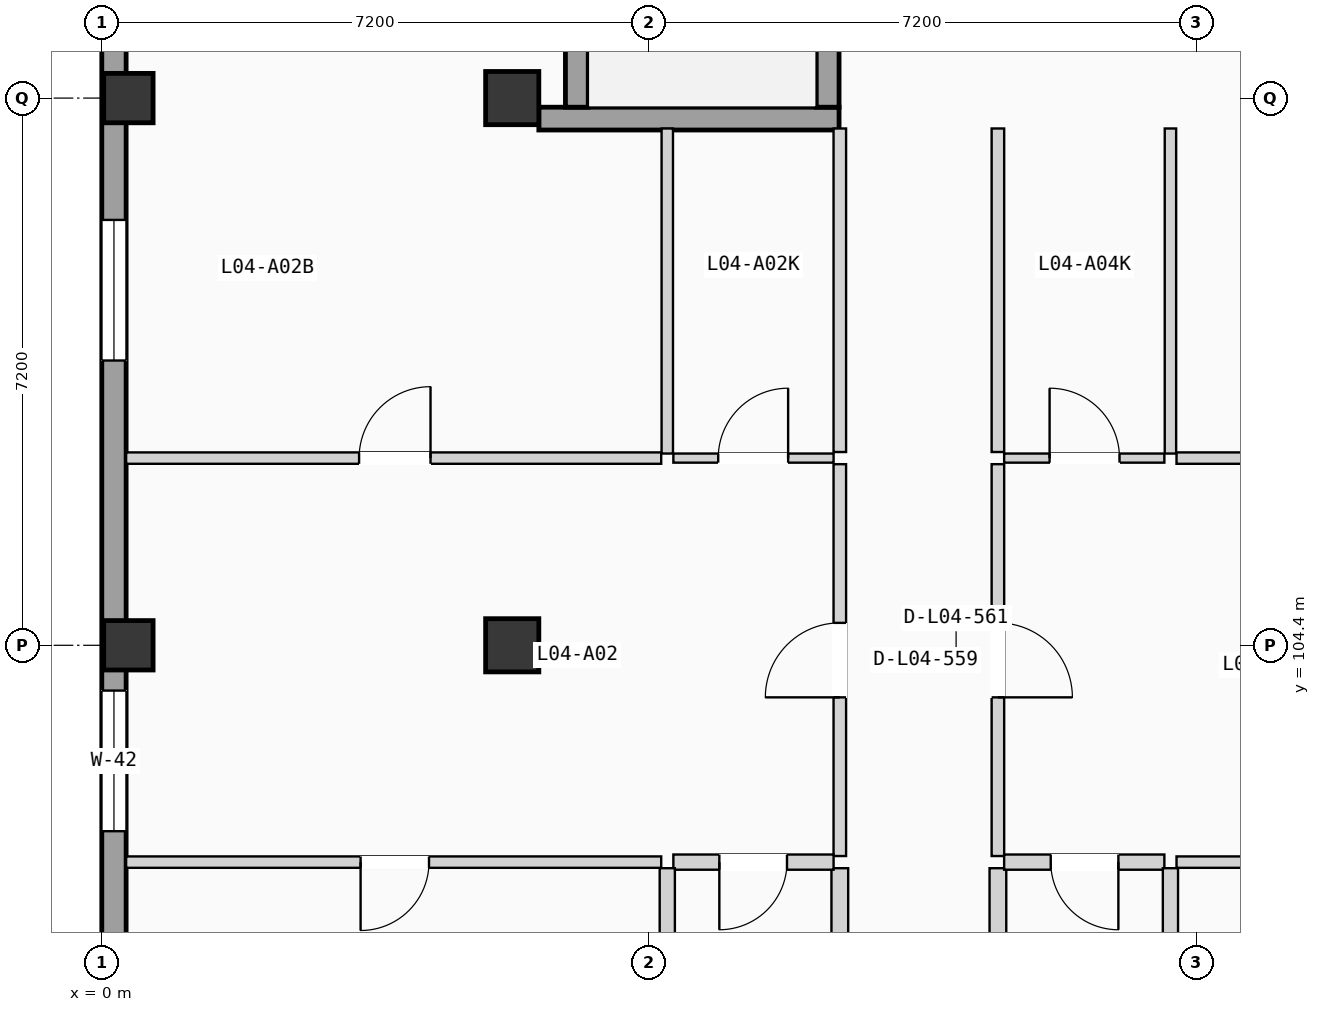
"""IFC4 building model, lengths in metres.
Left out: names, types, materials, properties, quantities, classifications, styles, units other than length and angle.
Written with IfcOpenShell. Run it as: python <this file> out.ifc"""

import sys

from ifc_helpers import new_model, si_unit, direction, frame, frame_2d, origin, origin_2d, place, context, subcontext, project, spatial, rectangle, extrude, element, fill, save


model = new_model("IFC4")
c1 = context("Model", 3, precision=1e-05, world=origin(), true_north=direction((0.0, 1.0)))
c2 = subcontext(c1, "Body", "Model", "MODEL_VIEW")
j1 = project(units=[si_unit("LENGTHUNIT", "METRE"), si_unit("PLANEANGLEUNIT", "RADIAN")], contexts=[c1])
p1 = place(None, origin())
s1 = spatial("IfcSite", under=j1, at=p1, CompositionType="ELEMENT")
p2 = place(p1, origin())
s2 = spatial("IfcBuilding", under=s1, at=p2, CompositionType="ELEMENT")
p3 = place(p2, frame((0.0, 0.0, 15.225)))
s3 = spatial("IfcBuildingStorey", under=s2, at=p3, CompositionType="ELEMENT", Elevation=15.225)
for number, where, z_axis, x_axis in (
    (1, (0.35, 104.4, 0.0), (0.0, 0.0, 1.0), (1.0, 0.0, 0.0)),
    (2, (0.35, 111.6, 0.0), (0.0, 0.0, 1.0), (1.0, 0.0, 0.0)),
):
    element("IfcColumn", number, at=place(p3, frame(where, z_axis=z_axis, x_axis=x_axis)), inside=s3, PredefinedType="COLUMN", context=c2, shape_type="SweptSolid", body=[
        extrude(rectangle(XDim=0.65, YDim=0.65, at=origin_2d()), origin(), (0.0, 0.0, 1.0), 3.15),
    ])
for number, where, z_axis, x_axis in (
    (3, (5.4, 104.4, 0.0), (0.0, 0.0, 1.0), (1.0, 0.0, 0.0)),
    (4, (5.4, 111.6, 0.0), (0.0, 0.0, 1.0), (1.0, 0.0, 0.0)),
):
    element("IfcColumn", number, at=place(p3, frame(where, z_axis=z_axis, x_axis=x_axis)), inside=s3, PredefinedType="COLUMN", context=c2, shape_type="SweptSolid", body=[
        extrude(rectangle(XDim=0.7, YDim=0.7, at=origin_2d()), origin(), (0.0, 0.0, 1.0), 3.15),
    ])
p4 = place(p3, frame((0.16, 68.72, 0.0), z_axis=(0.0, 0.0, 1.0), x_axis=(0.0, 1.0, 0.0)))
e5 = element("IfcWall", 5, at=p4, inside=s3, PredefinedType="SOLIDWALL", context=c2, shape_type="SweptSolid", body=[
    extrude(rectangle(XDim=49.76, YDim=0.32, at=frame_2d((24.88, 0.0))), origin(), (0.0, 0.0, 1.0), 2.89),
])
p5 = place(p4, frame((16.82, 0.0, 0.555)))
e6 = element("IfcOpeningElement", 6, at=p5, cuts=e5, PredefinedType="OPENING", context=c2, shape_type="SweptSolid", body=[
    extrude(rectangle(XDim=1.72, YDim=1.65, at=frame_2d((0.86, 0.825))), frame((0.0, 0.17, 0.0), z_axis=(0.0, -1.0, 0.0), x_axis=(1.0, 0.0, 0.0)), (0.0, 0.0, 1.0), 0.34),
])
p6 = place(p4, frame((10.07, 0.0, 0.85)))
e7 = element("IfcOpeningElement", 7, at=p6, cuts=e5, PredefinedType="OPENING", context=c2, shape_type="SweptSolid", body=[
    extrude(rectangle(XDim=0.95, YDim=1.2, at=frame_2d((0.475, 0.6))), frame((0.0, 0.17, 0.0), z_axis=(0.0, -1.0, 0.0), x_axis=(1.0, 0.0, 0.0)), (0.0, 0.0, 1.0), 0.34),
])
p7 = place(p4, frame((23.955, 0.0, 0.9)))
e8 = element("IfcOpeningElement", 8, at=p7, cuts=e5, PredefinedType="OPENING", context=c2, shape_type="SweptSolid", body=[
    extrude(rectangle(XDim=1.85, YDim=1.2, at=frame_2d((0.925, 0.6))), frame((0.0, 0.17, 0.0), z_axis=(0.0, -1.0, 0.0), x_axis=(1.0, 0.0, 0.0)), (0.0, 0.0, 1.0), 0.34),
])
p8 = place(p4, frame((33.234, 0.0, 0.855)))
e9 = element("IfcOpeningElement", 9, at=p8, cuts=e5, PredefinedType="OPENING", context=c2, shape_type="SweptSolid", body=[
    extrude(rectangle(XDim=1.85, YDim=1.35, at=frame_2d((0.925, 0.675))), frame((0.0, 0.17, 0.0), z_axis=(0.0, -1.0, 0.0), x_axis=(1.0, 0.0, 0.0)), (0.0, 0.0, 1.0), 0.34),
])
p9 = place(p4, frame((29.824, 0.0, 0.705)))
e10 = element("IfcOpeningElement", 10, at=p9, cuts=e5, PredefinedType="OPENING", context=c2, shape_type="SweptSolid", body=[
    extrude(rectangle(XDim=1.85, YDim=1.5, at=frame_2d((0.925, 0.75))), frame((0.0, 0.17, 0.0), z_axis=(0.0, -1.0, 0.0), x_axis=(1.0, 0.0, 0.0)), (0.0, 0.0, 1.0), 0.34),
])
p10 = place(p4, frame((39.427, 0.0, 0.555)))
e11 = element("IfcOpeningElement", 11, at=p10, cuts=e5, PredefinedType="OPENING", context=c2, shape_type="SweptSolid", body=[
    extrude(rectangle(XDim=1.85, YDim=1.65, at=frame_2d((0.925, 0.825))), frame((0.0, 0.17, 0.0), z_axis=(0.0, -1.0, 0.0), x_axis=(1.0, 0.0, 0.0)), (0.0, 0.0, 1.0), 0.34),
])
p11 = place(p3, frame((5.75, 111.33, 0.0), z_axis=(0.0, 0.0, 1.0), x_axis=(1.0, 0.0, 0.0)))
e12 = element("IfcWall", 12, at=p11, inside=s3, PredefinedType="SHEAR", context=c2, shape_type="SweptSolid", body=[
    extrude(rectangle(XDim=3.95, YDim=0.3, at=frame_2d((1.975, 0.0))), origin(), (0.0, 0.0, 1.0), 2.89),
])
p12 = place(p3, frame((6.25, 111.48, 0.0), z_axis=(0.0, 0.0, 1.0), x_axis=(0.0, 1.0, 0.0)))
e13 = element("IfcWall", 13, at=p12, inside=s3, PredefinedType="SHEAR", context=c2, shape_type="SweptSolid", body=[
    extrude(rectangle(XDim=7.0, YDim=0.3, at=frame_2d((3.5, 0.0))), origin(), (0.0, 0.0, 1.0), 2.89),
])
p13 = place(p3, frame((9.55, 111.48, 0.0), z_axis=(0.0, 0.0, 1.0), x_axis=(0.0, 1.0, 0.0)))
e14 = element("IfcWall", 14, at=p13, inside=s3, PredefinedType="SHEAR", context=c2, shape_type="SweptSolid", body=[
    extrude(rectangle(XDim=7.0, YDim=0.3, at=frame_2d((3.5, 0.0))), origin(), (0.0, 0.0, 1.0), 2.89),
])
p14 = place(p13, frame((5.625, 0.0, 0.0)))
e15 = element("IfcOpeningElement", 15, at=p14, cuts=e14, PredefinedType="OPENING", context=c2, shape_type="SweptSolid", body=[
    extrude(rectangle(XDim=1.15, YDim=2.12, at=frame_2d((0.575, 1.06))), frame((0.0, 0.16, 0.0), z_axis=(0.0, -1.0, 0.0), x_axis=(1.0, 0.0, 0.0)), (0.0, 0.0, 1.0), 0.32),
])
p15 = place(p3, frame((9.71, 101.627, 0.0), z_axis=(0.0, 0.0, 1.0), x_axis=(0.0, 1.0, 0.0)))
e16 = element("IfcWall", 16, at=p15, inside=s3, PredefinedType="PARTITIONING", context=c2, shape_type="SweptSolid", body=[
    extrude(rectangle(XDim=5.156, YDim=0.165, at=frame_2d((2.578, 0.0))), origin(), (0.0, 0.0, 1.0), 2.87),
])
p16 = place(p15, frame((2.088, 0.0, 0.0)))
e17 = element("IfcOpeningElement", 17, at=p16, cuts=e16, PredefinedType="OPENING", context=c2, shape_type="SweptSolid", body=[
    extrude(rectangle(XDim=0.98, YDim=2.08, at=frame_2d((0.49, 1.04))), frame((0.0, 0.093, 0.0), z_axis=(0.0, -1.0, 0.0), x_axis=(1.0, 0.0, 0.0)), (0.0, 0.0, 1.0), 0.185),
])
p17 = place(p3, frame((9.71, 97.21, 0.0), z_axis=(0.0, 0.0, 1.0), x_axis=(0.0, 1.0, 0.0)))
e18 = element("IfcWall", 18, at=p17, inside=s3, PredefinedType="PLUMBINGWALL", context=c2, shape_type="SweptSolid", body=[
    extrude(rectangle(XDim=4.257, YDim=0.22, at=frame_2d((2.128, 0.0))), origin(), (0.0, 0.0, 1.0), 2.87),
])
p18 = place(p3, frame((9.71, 106.943, 0.0), z_axis=(0.0, 0.0, 1.0), x_axis=(0.0, 1.0, 0.0)))
e19 = element("IfcWall", 19, at=p18, inside=s3, PredefinedType="PARTITIONING", context=c2, shape_type="SweptSolid", body=[
    extrude(rectangle(XDim=4.257, YDim=0.165, at=frame_2d((2.128, 0.0))), origin(), (0.0, 0.0, 1.0), 2.87),
])
p19 = place(p3, frame((11.79, 101.627, 0.0), z_axis=(0.0, 0.0, 1.0), x_axis=(0.0, 1.0, 0.0)))
e20 = element("IfcWall", 20, at=p19, inside=s3, PredefinedType="PARTITIONING", context=c2, shape_type="SweptSolid", body=[
    extrude(rectangle(XDim=5.156, YDim=0.165, at=frame_2d((2.578, 0.0))), origin(), (0.0, 0.0, 1.0), 2.87),
])
p20 = place(p19, frame((2.088, 0.0, 0.0)))
e21 = element("IfcOpeningElement", 21, at=p20, cuts=e20, PredefinedType="OPENING", context=c2, shape_type="SweptSolid", body=[
    extrude(rectangle(XDim=0.98, YDim=2.08, at=frame_2d((0.49, 1.04))), frame((0.0, 0.093, 0.0), z_axis=(0.0, -1.0, 0.0), x_axis=(1.0, 0.0, 0.0)), (0.0, 0.0, 1.0), 0.185),
])
p21 = place(p3, frame((11.79, 97.21, 0.0), z_axis=(0.0, 0.0, 1.0), x_axis=(0.0, 1.0, 0.0)))
e22 = element("IfcWall", 22, at=p21, inside=s3, PredefinedType="PLUMBINGWALL", context=c2, shape_type="SweptSolid", body=[
    extrude(rectangle(XDim=4.257, YDim=0.22, at=frame_2d((2.128, 0.0))), origin(), (0.0, 0.0, 1.0), 2.87),
])
p22 = place(p3, frame((11.79, 106.943, 0.0), z_axis=(0.0, 0.0, 1.0), x_axis=(0.0, 1.0, 0.0)))
e23 = element("IfcWall", 23, at=p22, inside=s3, PredefinedType="PARTITIONING", context=c2, shape_type="SweptSolid", body=[
    extrude(rectangle(XDim=4.257, YDim=0.165, at=frame_2d((2.128, 0.0))), origin(), (0.0, 0.0, 1.0), 2.87),
])
p23 = place(p3, frame((7.52, 101.547, 0.0), z_axis=(0.0, 0.0, 1.0), x_axis=(1.0, 0.0, 0.0)))
e24 = element("IfcWall", 24, at=p23, inside=s3, PredefinedType="PLUMBINGWALL", context=c2, shape_type="SweptSolid", body=[
    extrude(rectangle(XDim=2.108, YDim=0.2, at=frame_2d((1.054, 0.0))), origin(), (0.0, 0.0, 1.0), 2.87),
])
p24 = place(p23, frame((0.605, 0.0, 0.0)))
e25 = element("IfcOpeningElement", 25, at=p24, cuts=e24, PredefinedType="OPENING", context=c2, shape_type="SweptSolid", body=[
    extrude(rectangle(XDim=0.89, YDim=2.03, at=frame_2d((0.445, 1.015))), frame((0.0, 0.11, 0.0), z_axis=(0.0, -1.0, 0.0), x_axis=(1.0, 0.0, 0.0)), (0.0, 0.0, 1.0), 0.22),
])
p25 = place(p3, frame((7.52, 106.863, 0.0), z_axis=(0.0, 0.0, 1.0), x_axis=(1.0, 0.0, 0.0)))
e26 = element("IfcWall", 26, at=p25, inside=s3, PredefinedType="PARTITIONING", context=c2, shape_type="SweptSolid", body=[
    extrude(rectangle(XDim=2.108, YDim=0.12, at=frame_2d((1.054, 0.0))), origin(), (0.0, 0.0, 1.0), 2.87),
])
p26 = place(p25, frame((0.59, 0.0, 0.0)))
e27 = element("IfcOpeningElement", 27, at=p26, cuts=e26, PredefinedType="OPENING", context=c2, shape_type="SweptSolid", body=[
    extrude(rectangle(XDim=0.92, YDim=2.02, at=frame_2d((0.46, 1.01))), frame((0.0, 0.07, 0.0), z_axis=(0.0, -1.0, 0.0), x_axis=(1.0, 0.0, 0.0)), (0.0, 0.0, 1.0), 0.14),
])
p27 = place(p3, frame((0.32, 101.547, 0.0), z_axis=(0.0, 0.0, 1.0), x_axis=(1.0, 0.0, 0.0)))
e28 = element("IfcWall", 28, at=p27, inside=s3, PredefinedType="PARTITIONING", context=c2, shape_type="SweptSolid", body=[
    extrude(rectangle(XDim=7.04, YDim=0.15, at=frame_2d((3.52, 0.0))), origin(), (0.0, 0.0, 1.0), 2.87),
])
p28 = place(p27, frame((3.085, 0.0, 0.0)))
e29 = element("IfcOpeningElement", 29, at=p28, cuts=e28, PredefinedType="OPENING", context=c2, shape_type="SweptSolid", body=[
    extrude(rectangle(XDim=0.9, YDim=2.04, at=frame_2d((0.45, 1.02))), frame((0.0, 0.085, 0.0), z_axis=(0.0, -1.0, 0.0), x_axis=(1.0, 0.0, 0.0)), (0.0, 0.0, 1.0), 0.17),
])
p29 = place(p3, frame((0.32, 106.863, 0.0), z_axis=(0.0, 0.0, 1.0), x_axis=(1.0, 0.0, 0.0)))
e30 = element("IfcWall", 30, at=p29, inside=s3, PredefinedType="PARTITIONING", context=c2, shape_type="SweptSolid", body=[
    extrude(rectangle(XDim=7.04, YDim=0.15, at=frame_2d((3.52, 0.0))), origin(), (0.0, 0.0, 1.0), 2.87),
])
p30 = place(p29, frame((3.065, 0.0, 0.0)))
e31 = element("IfcOpeningElement", 31, at=p30, cuts=e30, PredefinedType="OPENING", context=c2, shape_type="SweptSolid", body=[
    extrude(rectangle(XDim=0.94, YDim=2.06, at=frame_2d((0.47, 1.03))), frame((0.0, 0.085, 0.0), z_axis=(0.0, -1.0, 0.0), x_axis=(1.0, 0.0, 0.0)), (0.0, 0.0, 1.0), 0.17),
])
p31 = place(p3, frame((7.44, 97.21, 0.0), z_axis=(0.0, 0.0, 1.0), x_axis=(0.0, 1.0, 0.0)))
e32 = element("IfcWall", 32, at=p31, inside=s3, PredefinedType="PLUMBINGWALL", context=c2, shape_type="SweptSolid", body=[
    extrude(rectangle(XDim=4.257, YDim=0.2, at=frame_2d((2.128, 0.0))), origin(), (0.0, 0.0, 1.0), 2.87),
])
p32 = place(p3, frame((7.44, 106.923, 0.0), z_axis=(0.0, 0.0, 1.0), x_axis=(0.0, 1.0, 0.0)))
e33 = element("IfcWall", 33, at=p32, inside=s3, PredefinedType="PARTITIONING", context=c2, shape_type="SweptSolid", body=[
    extrude(rectangle(XDim=4.277, YDim=0.15, at=frame_2d((2.138, 0.0))), origin(), (0.0, 0.0, 1.0), 2.87),
])
p33 = place(p3, frame((11.872, 101.547, 0.0), z_axis=(0.0, 0.0, 1.0), x_axis=(1.0, 0.0, 0.0)))
e34 = element("IfcWall", 34, at=p33, inside=s3, PredefinedType="PLUMBINGWALL", context=c2, shape_type="SweptSolid", body=[
    extrude(rectangle(XDim=2.108, YDim=0.2, at=frame_2d((1.054, 0.0))), origin(), (0.0, 0.0, 1.0), 2.87),
])
p34 = place(p33, frame((0.613, 0.0, 0.0)))
e35 = element("IfcOpeningElement", 35, at=p34, cuts=e34, PredefinedType="OPENING", context=c2, shape_type="SweptSolid", body=[
    extrude(rectangle(XDim=0.89, YDim=2.03, at=frame_2d((0.445, 1.015))), frame((0.0, 0.11, 0.0), z_axis=(0.0, -1.0, 0.0), x_axis=(1.0, 0.0, 0.0)), (0.0, 0.0, 1.0), 0.22),
])
p35 = place(p3, frame((11.872, 106.863, 0.0), z_axis=(0.0, 0.0, 1.0), x_axis=(1.0, 0.0, 0.0)))
e36 = element("IfcWall", 36, at=p35, inside=s3, PredefinedType="PARTITIONING", context=c2, shape_type="SweptSolid", body=[
    extrude(rectangle(XDim=2.108, YDim=0.12, at=frame_2d((1.054, 0.0))), origin(), (0.0, 0.0, 1.0), 2.87),
])
p36 = place(p35, frame((0.598, 0.0, 0.0)))
e37 = element("IfcOpeningElement", 37, at=p36, cuts=e36, PredefinedType="OPENING", context=c2, shape_type="SweptSolid", body=[
    extrude(rectangle(XDim=0.92, YDim=2.02, at=frame_2d((0.46, 1.01))), frame((0.0, 0.07, 0.0), z_axis=(0.0, -1.0, 0.0), x_axis=(1.0, 0.0, 0.0)), (0.0, 0.0, 1.0), 0.14),
])
p37 = place(p3, frame((14.14, 101.547, 0.0), z_axis=(0.0, 0.0, 1.0), x_axis=(1.0, 0.0, 0.0)))
e38 = element("IfcWall", 38, at=p37, inside=s3, PredefinedType="PARTITIONING", context=c2, shape_type="SweptSolid", body=[
    extrude(rectangle(XDim=7.14, YDim=0.15, at=frame_2d((3.57, 0.0))), origin(), (0.0, 0.0, 1.0), 2.87),
])
p38 = place(p37, frame((3.015, 0.0, 0.0)))
e39 = element("IfcOpeningElement", 39, at=p38, cuts=e38, PredefinedType="OPENING", context=c2, shape_type="SweptSolid", body=[
    extrude(rectangle(XDim=1.08, YDim=2.1, at=frame_2d((0.54, 1.05))), frame((0.0, 0.085, 0.0), z_axis=(0.0, -1.0, 0.0), x_axis=(1.0, 0.0, 0.0)), (0.0, 0.0, 1.0), 0.17),
])
p39 = place(p3, frame((14.14, 106.863, 0.0), z_axis=(0.0, 0.0, 1.0), x_axis=(1.0, 0.0, 0.0)))
e40 = element("IfcWall", 40, at=p39, inside=s3, PredefinedType="PARTITIONING", context=c2, shape_type="SweptSolid", body=[
    extrude(rectangle(XDim=7.14, YDim=0.15, at=frame_2d((3.57, 0.0))), origin(), (0.0, 0.0, 1.0), 2.87),
])
p40 = place(p39, frame((3.105, 0.0, 0.0)))
e41 = element("IfcOpeningElement", 41, at=p40, cuts=e40, PredefinedType="OPENING", context=c2, shape_type="SweptSolid", body=[
    extrude(rectangle(XDim=0.9, YDim=2.04, at=frame_2d((0.45, 1.02))), frame((0.0, 0.085, 0.0), z_axis=(0.0, -1.0, 0.0), x_axis=(1.0, 0.0, 0.0)), (0.0, 0.0, 1.0), 0.17),
])
p41 = place(p3, frame((14.06, 97.21, 0.0), z_axis=(0.0, 0.0, 1.0), x_axis=(0.0, 1.0, 0.0)))
e42 = element("IfcWall", 42, at=p41, inside=s3, PredefinedType="PLUMBINGWALL", context=c2, shape_type="SweptSolid", body=[
    extrude(rectangle(XDim=4.257, YDim=0.2, at=frame_2d((2.128, 0.0))), origin(), (0.0, 0.0, 1.0), 2.87),
])
p42 = place(p3, frame((14.06, 106.923, 0.0), z_axis=(0.0, 0.0, 1.0), x_axis=(0.0, 1.0, 0.0)))
e43 = element("IfcWall", 43, at=p42, inside=s3, PredefinedType="PARTITIONING", context=c2, shape_type="SweptSolid", body=[
    extrude(rectangle(XDim=4.277, YDim=0.15, at=frame_2d((2.138, 0.0))), origin(), (0.0, 0.0, 1.0), 2.87),
])
p43 = place(p8, origin())
e44 = element("IfcWindow", 44, at=p43, inside=s3, PartitioningType="DOUBLE_PANEL_VERTICAL", PredefinedType="WINDOW", context=c2, shape_type="SweptSolid", body=[
    extrude(rectangle(XDim=1.85, YDim=1.35, at=frame_2d((0.925, 0.675))), frame((0.0, 0.03, 0.0), z_axis=(0.0, -1.0, 0.0), x_axis=(1.0, 0.0, 0.0)), (0.0, 0.0, 1.0), 0.06),
])
fill(e9, e44)
p44 = place(p10, origin())
e45 = element("IfcWindow", 45, at=p44, inside=s3, PartitioningType="DOUBLE_PANEL_VERTICAL", PredefinedType="WINDOW", context=c2, shape_type="SweptSolid", body=[
    extrude(rectangle(XDim=1.85, YDim=1.65, at=frame_2d((0.925, 0.825))), frame((0.0, 0.03, 0.0), z_axis=(0.0, -1.0, 0.0), x_axis=(1.0, 0.0, 0.0)), (0.0, 0.0, 1.0), 0.06),
])
fill(e11, e45)
p45 = place(p16, origin())
e46 = element("IfcDoor", 46, at=p45, inside=s3, OperationType="SINGLE_SWING_LEFT", PredefinedType="DOOR", context=c2, shape_type="SweptSolid", body=[
    extrude(rectangle(XDim=0.98, YDim=2.08, at=frame_2d((0.49, 1.04))), frame((0.0, 0.025, 0.0), z_axis=(0.0, -1.0, 0.0), x_axis=(1.0, 0.0, 0.0)), (0.0, 0.0, 1.0), 0.05),
])
fill(e17, e46)
p46 = place(p20, frame((0.98, 0.0, 0.0), z_axis=(0.0, 0.0, 1.0), x_axis=(-1.0, 0.0, 0.0)))
e47 = element("IfcDoor", 47, at=p46, inside=s3, OperationType="SINGLE_SWING_LEFT", PredefinedType="DOOR", context=c2, shape_type="SweptSolid", body=[
    extrude(rectangle(XDim=0.98, YDim=2.08, at=frame_2d((0.49, 1.04))), frame((0.0, 0.025, 0.0), z_axis=(0.0, -1.0, 0.0), x_axis=(1.0, 0.0, 0.0)), (0.0, 0.0, 1.0), 0.05),
])
fill(e21, e47)
p47 = place(p24, frame((0.89, 0.0, 0.0), z_axis=(0.0, 0.0, 1.0), x_axis=(-1.0, 0.0, 0.0)))
e48 = element("IfcDoor", 48, at=p47, inside=s3, OperationType="SINGLE_SWING_LEFT", PredefinedType="DOOR", context=c2, shape_type="SweptSolid", body=[
    extrude(rectangle(XDim=0.89, YDim=2.03, at=frame_2d((0.445, 1.015))), frame((0.0, 0.025, 0.0), z_axis=(0.0, -1.0, 0.0), x_axis=(1.0, 0.0, 0.0)), (0.0, 0.0, 1.0), 0.05),
])
fill(e25, e48)
p48 = place(p26, origin())
e49 = element("IfcDoor", 49, at=p48, inside=s3, OperationType="SINGLE_SWING_RIGHT", PredefinedType="DOOR", context=c2, shape_type="SweptSolid", body=[
    extrude(rectangle(XDim=0.92, YDim=2.02, at=frame_2d((0.46, 1.01))), frame((0.0, 0.025, 0.0), z_axis=(0.0, -1.0, 0.0), x_axis=(1.0, 0.0, 0.0)), (0.0, 0.0, 1.0), 0.05),
])
fill(e27, e49)
p49 = place(p28, frame((0.9, 0.0, 0.0), z_axis=(0.0, 0.0, 1.0), x_axis=(-1.0, 0.0, 0.0)))
e50 = element("IfcDoor", 50, at=p49, inside=s3, OperationType="SINGLE_SWING_LEFT", PredefinedType="DOOR", context=c2, shape_type="SweptSolid", body=[
    extrude(rectangle(XDim=0.9, YDim=2.04, at=frame_2d((0.45, 1.02))), frame((0.0, 0.025, 0.0), z_axis=(0.0, -1.0, 0.0), x_axis=(1.0, 0.0, 0.0)), (0.0, 0.0, 1.0), 0.05),
])
fill(e29, e50)
p50 = place(p30, origin())
e51 = element("IfcDoor", 51, at=p50, inside=s3, OperationType="SINGLE_SWING_RIGHT", PredefinedType="DOOR", context=c2, shape_type="SweptSolid", body=[
    extrude(rectangle(XDim=0.94, YDim=2.06, at=frame_2d((0.47, 1.03))), frame((0.0, 0.025, 0.0), z_axis=(0.0, -1.0, 0.0), x_axis=(1.0, 0.0, 0.0)), (0.0, 0.0, 1.0), 0.05),
])
fill(e31, e51)
p51 = place(p34, frame((0.89, 0.0, 0.0), z_axis=(0.0, 0.0, 1.0), x_axis=(-1.0, 0.0, 0.0)))
e52 = element("IfcDoor", 52, at=p51, inside=s3, OperationType="SINGLE_SWING_RIGHT", PredefinedType="DOOR", context=c2, shape_type="SweptSolid", body=[
    extrude(rectangle(XDim=0.89, YDim=2.03, at=frame_2d((0.445, 1.015))), frame((0.0, 0.025, 0.0), z_axis=(0.0, -1.0, 0.0), x_axis=(1.0, 0.0, 0.0)), (0.0, 0.0, 1.0), 0.05),
])
fill(e35, e52)
p52 = place(p36, origin())
e53 = element("IfcDoor", 53, at=p52, inside=s3, OperationType="SINGLE_SWING_LEFT", PredefinedType="DOOR", context=c2, shape_type="SweptSolid", body=[
    extrude(rectangle(XDim=0.92, YDim=2.02, at=frame_2d((0.46, 1.01))), frame((0.0, 0.025, 0.0), z_axis=(0.0, -1.0, 0.0), x_axis=(1.0, 0.0, 0.0)), (0.0, 0.0, 1.0), 0.05),
])
fill(e37, e53)
save(model, sys.argv[1])
